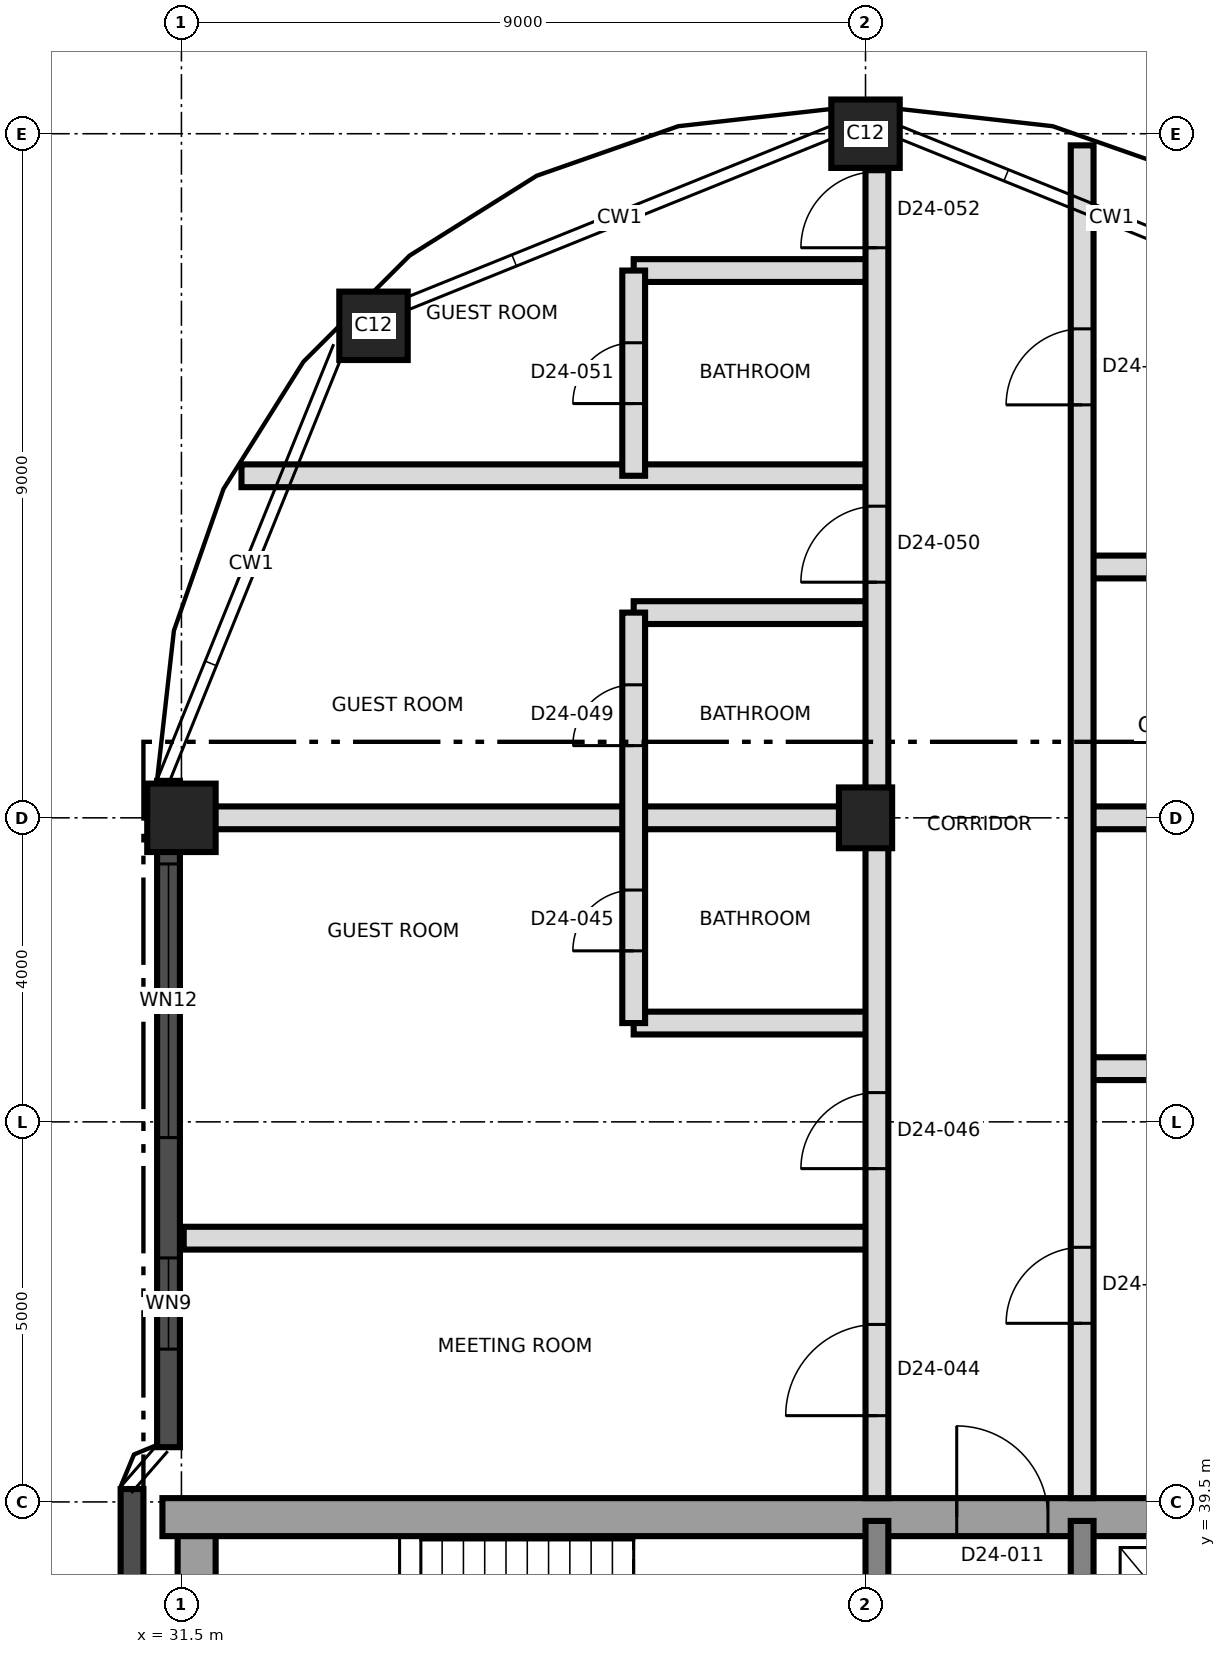
"""IFC4 building model, lengths in metres.
Left out: names, types, materials, properties, quantities, classifications, styles, units other than length and angle.
Written with IfcOpenShell. Run it as: python <this file> out.ifc"""

import sys

from ifc_helpers import new_model, si_unit, direction, frame, frame_2d, origin, origin_2d, place, context, subcontext, project, spatial, rectangle, extrude, element, fill, save


model = new_model("IFC4")
c1 = context("Model", 3, precision=1e-05, world=origin(), true_north=direction((0.0, 1.0)))
c2 = subcontext(c1, "Body", "Model", "MODEL_VIEW")
j1 = project(units=[si_unit("LENGTHUNIT", "METRE"), si_unit("PLANEANGLEUNIT", "RADIAN")], contexts=[c1])
p1 = place(None, origin())
s1 = spatial("IfcSite", under=j1, at=p1, CompositionType="ELEMENT")
p2 = place(p1, origin())
s2 = spatial("IfcBuilding", under=s1, at=p2, CompositionType="ELEMENT")
p3 = place(p2, frame((0.0, 0.0, 214.3)))
s3 = spatial("IfcBuildingStorey", under=s2, at=p3, CompositionType="ELEMENT", Elevation=214.3)
p4 = place(p3, frame((31.7, 21.75, 0.0), z_axis=(0.0, 0.0, 1.0), x_axis=(0.0, 1.0, 0.0)))
e1 = element("IfcWall", 1, at=p4, inside=s3, PredefinedType="SHEAR", context=c2, shape_type="SweptSolid", body=[
    extrude(rectangle(XDim=17.5, YDim=0.5, at=frame_2d((8.75, 0.0))), origin(), (0.0, 0.0, 1.0), 3.7),
])
p5 = place(p3, frame((31.25, 39.3, 0.0), z_axis=(0.0, 0.0, 1.0), x_axis=(1.0, 0.0, 0.0)))
e2 = element("IfcWall", 2, at=p5, inside=s3, PredefinedType="SHEAR", context=c2, shape_type="SweptSolid", body=[
    extrude(rectangle(XDim=27.0, YDim=0.5, at=frame_2d((13.5, 0.0))), origin(), (0.0, 0.0, 1.0), 3.7),
])
p6 = place(p5, frame((10.45, 0.0, 0.0)))
e3 = element("IfcOpeningElement", 3, at=p6, cuts=e2, PredefinedType="OPENING", context=c2, shape_type="SweptSolid", body=[
    extrude(rectangle(XDim=1.2, YDim=2.1, at=frame_2d((0.6, 1.05))), frame((0.0, 0.26, 0.0), z_axis=(0.0, -1.0, 0.0), x_axis=(1.0, 0.0, 0.0)), (0.0, 0.0, 1.0), 0.52),
])
for number, where, z_axis, x_axis in (
    (4, (40.65, 33.5, 0.0), (0.0, 0.0, 1.0), (0.0, 1.0, 0.0)),
    (5, (43.35, 33.5, 0.0), (0.0, 0.0, 1.0), (0.0, 1.0, 0.0)),
):
    element("IfcWall", number, at=place(p3, frame(where, z_axis=z_axis, x_axis=x_axis)), inside=s3, PredefinedType="SHEAR", context=c2, shape_type="SweptSolid", body=[
        extrude(rectangle(XDim=5.75, YDim=0.3, at=frame_2d((2.875, 0.0))), origin(), (0.0, 0.0, 1.0), 3.7),
    ])
p7 = place(p3, frame((31.5, 48.5, 0.0), z_axis=(0.0, 0.0, 1.0), x_axis=(1.0, 0.0, 0.0)))
e6 = element("IfcColumn", 6, at=p7, inside=s3, PredefinedType="COLUMN", context=c2, shape_type="SweptSolid", body=[
    extrude(rectangle(XDim=0.9, YDim=0.9, at=origin_2d()), origin(), (0.0, 0.0, 1.0), 3.7),
])
p8 = place(p3, frame((40.5, 48.5, 0.0), z_axis=(0.0, 0.0, 1.0), x_axis=(0.0, 1.0, 0.0)))
e7 = element("IfcColumn", 7, at=p8, inside=s3, PredefinedType="COLUMN", context=c2, shape_type="SweptSolid", body=[
    extrude(rectangle(XDim=0.8, YDim=0.7, at=origin_2d()), origin(), (0.0, 0.0, 1.0), 3.7),
])
for number, where, z_axis, x_axis in (
    (8, (34.027, 54.973, 0.0), (0.0, 0.0, 1.0), (1.0, 0.0, 0.0)),
    (9, (40.5, 57.5, 0.0), (0.0, 0.0, 1.0), (1.0, 0.0, 0.0)),
):
    element("IfcColumn", number, at=place(p3, frame(where, z_axis=z_axis, x_axis=x_axis)), inside=s3, PredefinedType="COLUMN", context=c2, shape_type="SweptSolid", body=[
        extrude(rectangle(XDim=0.9, YDim=0.9, at=origin_2d()), origin(), (0.0, 0.0, 1.0), 3.7),
    ])
p9 = place(p3, frame((31.33, 48.986, 0.0), z_axis=(0.0, 0.0, 1.0), x_axis=(0.0, -1.0, 0.0)))
e10 = element("IfcWall", 10, at=p9, inside=s3, PredefinedType="SOLIDWALL", context=c2, shape_type="SweptSolid", body=[
    extrude(rectangle(XDim=8.766, YDim=0.3, at=frame_2d((4.383, 0.0))), origin(), (0.0, 0.0, 1.0), 3.4),
])
p10 = place(p9, frame((1.093, 0.0, 0.9)))
e11 = element("IfcOpeningElement", 11, at=p10, cuts=e10, PredefinedType="OPENING", context=c2, shape_type="SweptSolid", body=[
    extrude(rectangle(XDim=3.6, YDim=1.5, at=frame_2d((1.8, 0.75))), frame((0.0, 0.16, 0.0), z_axis=(0.0, -1.0, 0.0), x_axis=(1.0, 0.0, 0.0)), (0.0, 0.0, 1.0), 0.32),
])
p11 = place(p9, frame((6.276, 0.0, 0.9)))
e12 = element("IfcOpeningElement", 12, at=p11, cuts=e10, PredefinedType="OPENING", context=c2, shape_type="SweptSolid", body=[
    extrude(rectangle(XDim=1.2, YDim=1.5, at=frame_2d((0.6, 0.75))), frame((0.0, 0.16, 0.0), z_axis=(0.0, -1.0, 0.0), x_axis=(1.0, 0.0, 0.0)), (0.0, 0.0, 1.0), 0.32),
])
p12 = place(p3, frame((30.85, 39.67, 0.0), z_axis=(0.0, 0.0, 1.0), x_axis=(0.0, -1.0, 0.0)))
e13 = element("IfcWall", 13, at=p12, inside=s3, PredefinedType="SOLIDWALL", context=c2, shape_type="SweptSolid", body=[
    extrude(rectangle(XDim=18.31, YDim=0.3, at=frame_2d((9.155, 0.0))), origin(), (0.0, 0.0, 1.0), 3.4),
])
p13 = place(p3, frame((31.53, 42.97, 0.0), z_axis=(0.0, 0.0, 1.0), x_axis=(1.0, 0.0, 0.0)))
e14 = element("IfcWall", 14, at=p13, inside=s3, PredefinedType="PARTITIONING", context=c2, shape_type="SweptSolid", body=[
    extrude(rectangle(XDim=9.12, YDim=0.3, at=frame_2d((4.56, 0.0))), origin(), (0.0, 0.0, 1.0), 3.4),
])
p14 = place(p3, frame((43.35, 45.2, 0.0), z_axis=(0.0, 0.0, 1.0), x_axis=(1.0, 0.0, 0.0)))
e15 = element("IfcWall", 15, at=p14, inside=s3, PredefinedType="PARTITIONING", context=c2, shape_type="SweptSolid", body=[
    extrude(rectangle(XDim=3.5, YDim=0.3, at=frame_2d((1.75, 0.0))), origin(), (0.0, 0.0, 1.0), 3.4),
])
p15 = place(p3, frame((37.45, 45.8, 0.0), z_axis=(0.0, 0.0, 1.0), x_axis=(1.0, 0.0, 0.0)))
e16 = element("IfcWall", 16, at=p15, inside=s3, PredefinedType="PARTITIONING", context=c2, shape_type="SweptSolid", body=[
    extrude(rectangle(XDim=3.2, YDim=0.3, at=frame_2d((1.6, 0.0))), origin(), (0.0, 0.0, 1.0), 3.4),
])
p16 = place(p3, frame((31.53, 48.5, 0.0), z_axis=(0.0, 0.0, 1.0), x_axis=(1.0, 0.0, 0.0)))
e17 = element("IfcWall", 17, at=p16, inside=s3, PredefinedType="PARTITIONING", context=c2, shape_type="SweptSolid", body=[
    extrude(rectangle(XDim=9.12, YDim=0.3, at=frame_2d((4.56, 0.0))), origin(), (0.0, 0.0, 1.0), 3.4),
])
p17 = place(p3, frame((43.35, 48.5, 0.0), z_axis=(0.0, 0.0, 1.0), x_axis=(1.0, 0.0, 0.0)))
e18 = element("IfcWall", 18, at=p17, inside=s3, PredefinedType="PARTITIONING", context=c2, shape_type="SweptSolid", body=[
    extrude(rectangle(XDim=6.12, YDim=0.3, at=frame_2d((3.06, 0.0))), origin(), (0.0, 0.0, 1.0), 3.4),
])
p18 = place(p3, frame((37.45, 51.2, 0.0), z_axis=(0.0, 0.0, 1.0), x_axis=(1.0, 0.0, 0.0)))
e19 = element("IfcWall", 19, at=p18, inside=s3, PredefinedType="PARTITIONING", context=c2, shape_type="SweptSolid", body=[
    extrude(rectangle(XDim=3.2, YDim=0.3, at=frame_2d((1.6, 0.0))), origin(), (0.0, 0.0, 1.0), 3.4),
])
p19 = place(p3, frame((43.35, 51.8, 0.0), z_axis=(0.0, 0.0, 1.0), x_axis=(1.0, 0.0, 0.0)))
e20 = element("IfcWall", 20, at=p19, inside=s3, PredefinedType="PARTITIONING", context=c2, shape_type="SweptSolid", body=[
    extrude(rectangle(XDim=3.5, YDim=0.3, at=frame_2d((1.75, 0.0))), origin(), (0.0, 0.0, 1.0), 3.4),
])
p20 = place(p3, frame((32.29, 53.0, 0.0), z_axis=(0.0, 0.0, 1.0), x_axis=(1.0, 0.0, 0.0)))
e21 = element("IfcWall", 21, at=p20, inside=s3, PredefinedType="PARTITIONING", context=c2, shape_type="SweptSolid", body=[
    extrude(rectangle(XDim=8.36, YDim=0.3, at=frame_2d((4.18, 0.0))), origin(), (0.0, 0.0, 1.0), 3.4),
])
p21 = place(p3, frame((37.45, 55.7, 0.0), z_axis=(0.0, 0.0, 1.0), x_axis=(1.0, 0.0, 0.0)))
e22 = element("IfcWall", 22, at=p21, inside=s3, PredefinedType="PARTITIONING", context=c2, shape_type="SweptSolid", body=[
    extrude(rectangle(XDim=3.2, YDim=0.3, at=frame_2d((1.6, 0.0))), origin(), (0.0, 0.0, 1.0), 3.4),
])
p22 = place(p3, frame((37.45, 45.8, 0.0), z_axis=(0.0, 0.0, 1.0), x_axis=(0.0, 1.0, 0.0)))
e23 = element("IfcWall", 23, at=p22, inside=s3, PredefinedType="PARTITIONING", context=c2, shape_type="SweptSolid", body=[
    extrude(rectangle(XDim=5.4, YDim=0.3, at=frame_2d((2.7, 0.0))), origin(), (0.0, 0.0, 1.0), 3.4),
])
p23 = place(p22, frame((0.95, 0.0, 0.0)))
e24 = element("IfcOpeningElement", 24, at=p23, cuts=e23, PredefinedType="OPENING", context=c2, shape_type="SweptSolid", body=[
    extrude(rectangle(XDim=0.8, YDim=2.1, at=frame_2d((0.4, 1.05))), frame((0.0, 0.16, 0.0), z_axis=(0.0, -1.0, 0.0), x_axis=(1.0, 0.0, 0.0)), (0.0, 0.0, 1.0), 0.32),
])
p24 = place(p22, frame((3.65, 0.0, 0.0)))
e25 = element("IfcOpeningElement", 25, at=p24, cuts=e23, PredefinedType="OPENING", context=c2, shape_type="SweptSolid", body=[
    extrude(rectangle(XDim=0.8, YDim=2.1, at=frame_2d((0.4, 1.05))), frame((0.0, 0.16, 0.0), z_axis=(0.0, -1.0, 0.0), x_axis=(1.0, 0.0, 0.0)), (0.0, 0.0, 1.0), 0.32),
])
p25 = place(p3, frame((37.45, 53.0, 0.0), z_axis=(0.0, 0.0, 1.0), x_axis=(0.0, 1.0, 0.0)))
e26 = element("IfcWall", 26, at=p25, inside=s3, PredefinedType="PARTITIONING", context=c2, shape_type="SweptSolid", body=[
    extrude(rectangle(XDim=2.7, YDim=0.3, at=frame_2d((1.35, 0.0))), origin(), (0.0, 0.0, 1.0), 3.4),
])
p26 = place(p25, frame((0.95, 0.0, 0.0)))
e27 = element("IfcOpeningElement", 27, at=p26, cuts=e26, PredefinedType="OPENING", context=c2, shape_type="SweptSolid", body=[
    extrude(rectangle(XDim=0.8, YDim=2.1, at=frame_2d((0.4, 1.05))), frame((0.0, 0.16, 0.0), z_axis=(0.0, -1.0, 0.0), x_axis=(1.0, 0.0, 0.0)), (0.0, 0.0, 1.0), 0.32),
])
p27 = place(p3, frame((40.65, 39.55, 0.0), z_axis=(0.0, 0.0, 1.0), x_axis=(0.0, 1.0, 0.0)))
e28 = element("IfcWall", 28, at=p27, inside=s3, PredefinedType="PARTITIONING", context=c2, shape_type="SweptSolid", body=[
    extrude(rectangle(XDim=17.92, YDim=0.3, at=frame_2d((8.96, 0.0))), origin(), (0.0, 0.0, 1.0), 3.4),
])
p28 = place(p27, frame((1.085, 0.0, 0.0)))
e29 = element("IfcOpeningElement", 29, at=p28, cuts=e28, PredefinedType="OPENING", context=c2, shape_type="SweptSolid", body=[
    extrude(rectangle(XDim=1.2, YDim=2.1, at=frame_2d((0.6, 1.05))), frame((0.0, 0.16, 0.0), z_axis=(0.0, -1.0, 0.0), x_axis=(1.0, 0.0, 0.0)), (0.0, 0.0, 1.0), 0.32),
])
p29 = place(p27, frame((4.335, 0.0, 0.0)))
e30 = element("IfcOpeningElement", 30, at=p29, cuts=e28, PredefinedType="OPENING", context=c2, shape_type="SweptSolid", body=[
    extrude(rectangle(XDim=1.0, YDim=2.1, at=frame_2d((0.5, 1.05))), frame((0.0, 0.16, 0.0), z_axis=(0.0, -1.0, 0.0), x_axis=(1.0, 0.0, 0.0)), (0.0, 0.0, 1.0), 0.32),
])
p30 = place(p27, frame((12.05, 0.0, 0.0)))
e31 = element("IfcOpeningElement", 31, at=p30, cuts=e28, PredefinedType="OPENING", context=c2, shape_type="SweptSolid", body=[
    extrude(rectangle(XDim=1.0, YDim=2.1, at=frame_2d((0.5, 1.05))), frame((0.0, 0.16, 0.0), z_axis=(0.0, -1.0, 0.0), x_axis=(1.0, 0.0, 0.0)), (0.0, 0.0, 1.0), 0.32),
])
p31 = place(p27, frame((16.45, 0.0, 0.0)))
e32 = element("IfcOpeningElement", 32, at=p31, cuts=e28, PredefinedType="OPENING", context=c2, shape_type="SweptSolid", body=[
    extrude(rectangle(XDim=1.0, YDim=2.1, at=frame_2d((0.5, 1.05))), frame((0.0, 0.16, 0.0), z_axis=(0.0, -1.0, 0.0), x_axis=(1.0, 0.0, 0.0)), (0.0, 0.0, 1.0), 0.32),
])
p32 = place(p3, frame((43.35, 39.55, 0.0), z_axis=(0.0, 0.0, 1.0), x_axis=(0.0, 1.0, 0.0)))
e33 = element("IfcWall", 33, at=p32, inside=s3, PredefinedType="PARTITIONING", context=c2, shape_type="SweptSolid", body=[
    extrude(rectangle(XDim=17.797, YDim=0.3, at=frame_2d((8.898, 0.0))), origin(), (0.0, 0.0, 1.0), 3.4),
])
p33 = place(p32, frame((2.3, 0.0, 0.0)))
e34 = element("IfcOpeningElement", 34, at=p33, cuts=e33, PredefinedType="OPENING", context=c2, shape_type="SweptSolid", body=[
    extrude(rectangle(XDim=1.0, YDim=2.4, at=frame_2d((0.5, 1.2))), frame((0.0, 0.16, 0.0), z_axis=(0.0, -1.0, 0.0), x_axis=(1.0, 0.0, 0.0)), (0.0, 0.0, 1.0), 0.32),
])
p34 = place(p32, frame((14.383, 0.0, 0.0)))
e35 = element("IfcOpeningElement", 35, at=p34, cuts=e33, PredefinedType="OPENING", context=c2, shape_type="SweptSolid", body=[
    extrude(rectangle(XDim=1.0, YDim=2.4, at=frame_2d((0.5, 1.2))), frame((0.0, 0.16, 0.0), z_axis=(0.0, -1.0, 0.0), x_axis=(1.0, 0.0, 0.0)), (0.0, 0.0, 1.0), 0.32),
])
p35 = place(p10, origin())
e36 = element("IfcWindow", 36, at=p35, inside=s3, PartitioningType="SINGLE_PANEL", PredefinedType="WINDOW", context=c2, shape_type="SweptSolid", body=[
    extrude(rectangle(XDim=3.6, YDim=1.5, at=frame_2d((1.8, 0.75))), frame((0.0, 0.03, 0.0), z_axis=(0.0, -1.0, 0.0), x_axis=(1.0, 0.0, 0.0)), (0.0, 0.0, 1.0), 0.06),
])
fill(e11, e36)
p36 = place(p11, origin())
e37 = element("IfcWindow", 37, at=p36, inside=s3, PartitioningType="SINGLE_PANEL", PredefinedType="WINDOW", context=c2, shape_type="SweptSolid", body=[
    extrude(rectangle(XDim=1.2, YDim=1.5, at=frame_2d((0.6, 0.75))), frame((0.0, 0.03, 0.0), z_axis=(0.0, -1.0, 0.0), x_axis=(1.0, 0.0, 0.0)), (0.0, 0.0, 1.0), 0.06),
])
fill(e12, e37)
p37 = place(p6, origin())
e38 = element("IfcDoor", 38, at=p37, inside=s3, OperationType="SINGLE_SWING_RIGHT", PredefinedType="DOOR", context=c2, shape_type="SweptSolid", body=[
    extrude(rectangle(XDim=1.2, YDim=2.1, at=frame_2d((0.6, 1.05))), frame((0.0, 0.025, 0.0), z_axis=(0.0, -1.0, 0.0), x_axis=(1.0, 0.0, 0.0)), (0.0, 0.0, 1.0), 0.05),
])
fill(e3, e38)
p38 = place(p33, origin())
e39 = element("IfcDoor", 39, at=p38, inside=s3, OperationType="SINGLE_SWING_RIGHT", PredefinedType="DOOR", context=c2, shape_type="SweptSolid", body=[
    extrude(rectangle(XDim=1.0, YDim=2.4, at=frame_2d((0.5, 1.2))), frame((0.0, 0.025, 0.0), z_axis=(0.0, -1.0, 0.0), x_axis=(1.0, 0.0, 0.0)), (0.0, 0.0, 1.0), 0.05),
])
fill(e34, e39)
p39 = place(p28, origin())
e40 = element("IfcDoor", 40, at=p39, inside=s3, OperationType="SINGLE_SWING_LEFT", PredefinedType="DOOR", context=c2, shape_type="SweptSolid", body=[
    extrude(rectangle(XDim=1.2, YDim=2.1, at=frame_2d((0.6, 1.05))), frame((0.0, 0.025, 0.0), z_axis=(0.0, -1.0, 0.0), x_axis=(1.0, 0.0, 0.0)), (0.0, 0.0, 1.0), 0.05),
])
fill(e29, e40)
p40 = place(p23, origin())
e41 = element("IfcDoor", 41, at=p40, inside=s3, OperationType="SINGLE_SWING_LEFT", PredefinedType="DOOR", context=c2, shape_type="SweptSolid", body=[
    extrude(rectangle(XDim=0.8, YDim=2.1, at=frame_2d((0.4, 1.05))), frame((0.0, 0.025, 0.0), z_axis=(0.0, -1.0, 0.0), x_axis=(1.0, 0.0, 0.0)), (0.0, 0.0, 1.0), 0.05),
])
fill(e24, e41)
p41 = place(p29, origin())
e42 = element("IfcDoor", 42, at=p41, inside=s3, OperationType="SINGLE_SWING_RIGHT", PredefinedType="DOOR", context=c2, shape_type="SweptSolid", body=[
    extrude(rectangle(XDim=1.0, YDim=2.1, at=frame_2d((0.5, 1.05))), frame((0.0, 0.025, 0.0), z_axis=(0.0, -1.0, 0.0), x_axis=(1.0, 0.0, 0.0)), (0.0, 0.0, 1.0), 0.05),
])
fill(e30, e42)
p42 = place(p34, origin())
e43 = element("IfcDoor", 43, at=p42, inside=s3, OperationType="SINGLE_SWING_LEFT", PredefinedType="DOOR", context=c2, shape_type="SweptSolid", body=[
    extrude(rectangle(XDim=1.0, YDim=2.4, at=frame_2d((0.5, 1.2))), frame((0.0, 0.025, 0.0), z_axis=(0.0, -1.0, 0.0), x_axis=(1.0, 0.0, 0.0)), (0.0, 0.0, 1.0), 0.05),
])
fill(e35, e43)
p43 = place(p24, origin())
e44 = element("IfcDoor", 44, at=p43, inside=s3, OperationType="SINGLE_SWING_LEFT", PredefinedType="DOOR", context=c2, shape_type="SweptSolid", body=[
    extrude(rectangle(XDim=0.8, YDim=2.1, at=frame_2d((0.4, 1.05))), frame((0.0, 0.025, 0.0), z_axis=(0.0, -1.0, 0.0), x_axis=(1.0, 0.0, 0.0)), (0.0, 0.0, 1.0), 0.05),
])
fill(e25, e44)
p44 = place(p30, origin())
e45 = element("IfcDoor", 45, at=p44, inside=s3, OperationType="SINGLE_SWING_LEFT", PredefinedType="DOOR", context=c2, shape_type="SweptSolid", body=[
    extrude(rectangle(XDim=1.0, YDim=2.1, at=frame_2d((0.5, 1.05))), frame((0.0, 0.025, 0.0), z_axis=(0.0, -1.0, 0.0), x_axis=(1.0, 0.0, 0.0)), (0.0, 0.0, 1.0), 0.05),
])
fill(e31, e45)
p45 = place(p26, origin())
e46 = element("IfcDoor", 46, at=p45, inside=s3, OperationType="SINGLE_SWING_LEFT", PredefinedType="DOOR", context=c2, shape_type="SweptSolid", body=[
    extrude(rectangle(XDim=0.8, YDim=2.1, at=frame_2d((0.4, 1.05))), frame((0.0, 0.025, 0.0), z_axis=(0.0, -1.0, 0.0), x_axis=(1.0, 0.0, 0.0)), (0.0, 0.0, 1.0), 0.05),
])
fill(e27, e46)
p46 = place(p31, origin())
e47 = element("IfcDoor", 47, at=p46, inside=s3, OperationType="SINGLE_SWING_RIGHT", PredefinedType="DOOR", context=c2, shape_type="SweptSolid", body=[
    extrude(rectangle(XDim=1.0, YDim=2.1, at=frame_2d((0.5, 1.05))), frame((0.0, 0.025, 0.0), z_axis=(0.0, -1.0, 0.0), x_axis=(1.0, 0.0, 0.0)), (0.0, 0.0, 1.0), 0.05),
])
fill(e32, e47)
save(model, sys.argv[1])
